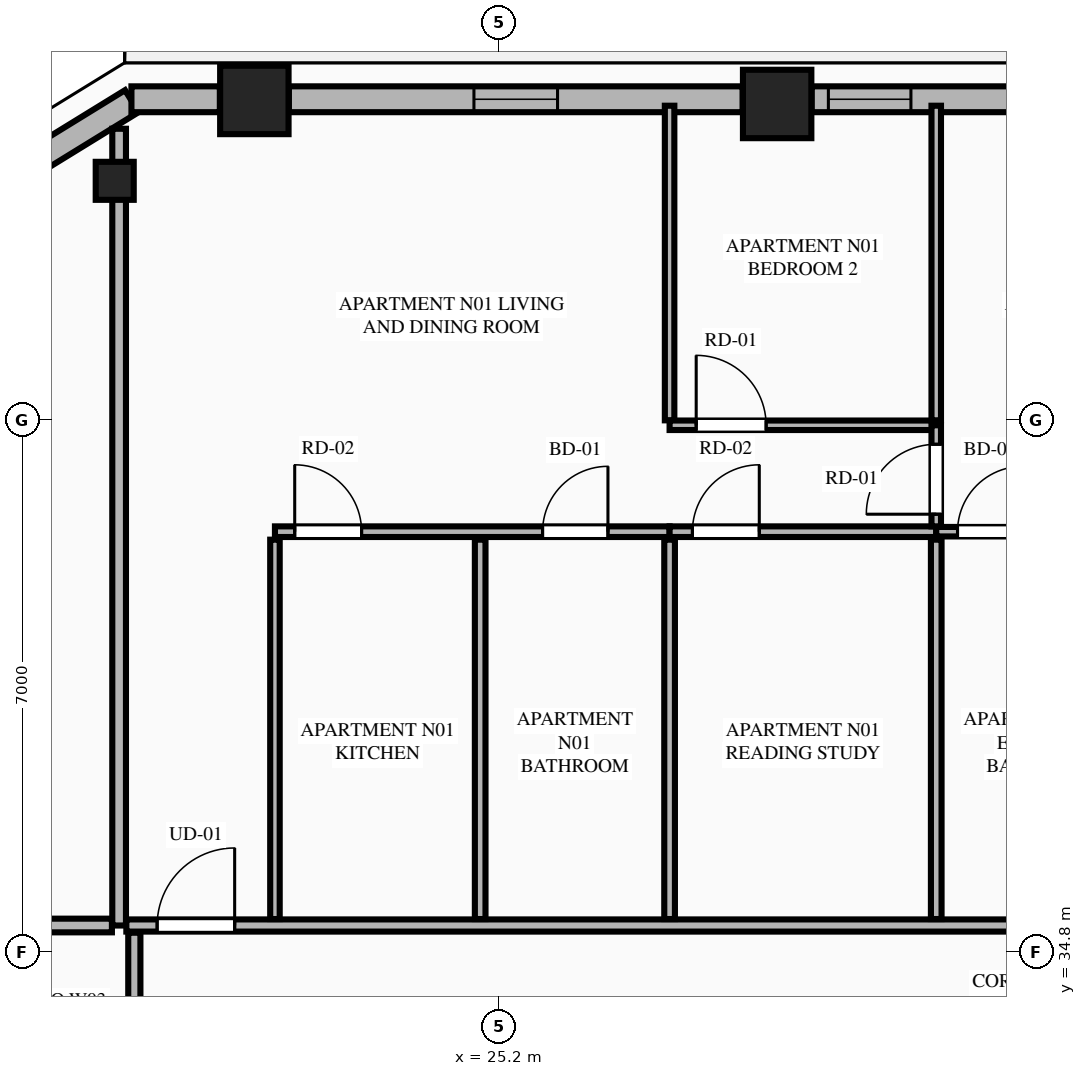
"""IFC4 building model, lengths in metres.
Left out: names, types, materials, properties, quantities, classifications, styles, units other than length and angle.
Written with IfcOpenShell. Run it as: python <this file> out.ifc"""

import sys

from ifc_helpers import new_model, si_unit, direction, frame, frame_2d, origin, origin_2d, place, context, subcontext, project, spatial, rectangle, extrude, element, fill, save


model = new_model("IFC4")
c1 = context("Model", 3, precision=1e-05, world=origin(), true_north=direction((0.0, 1.0)))
c2 = subcontext(c1, "Body", "Model", "MODEL_VIEW")
j1 = project(units=[si_unit("LENGTHUNIT", "METRE"), si_unit("PLANEANGLEUNIT", "RADIAN")], contexts=[c1])
p1 = place(None, origin())
s1 = spatial("IfcSite", under=j1, at=p1, CompositionType="ELEMENT")
p2 = place(p1, origin())
s2 = spatial("IfcBuilding", under=s1, at=p2, CompositionType="ELEMENT")
p3 = place(p2, frame((0.0, 0.0, 200.3)))
s3 = spatial("IfcBuildingStorey", under=s2, at=p3, CompositionType="ELEMENT", Elevation=200.3)
for number, where, z_axis, x_axis in (
    (1, (28.857, 45.958, 0.0), (0.0, 0.0, 1.0), (1.0, 0.0, 0.0)),
    (2, (21.979, 46.011, 0.0), (0.0, 0.0, 1.0), (1.0, 0.0, 0.0)),
):
    element("IfcColumn", number, at=place(p3, frame(where, z_axis=z_axis, x_axis=x_axis)), inside=s3, PredefinedType="COLUMN", context=c2, shape_type="SweptSolid", body=[
        extrude(rectangle(XDim=0.9, YDim=0.9, at=origin_2d()), origin(), (0.0, 0.0, 1.0), 3.55),
    ])
p4 = place(p3, frame((20.142, 44.947, 0.0), z_axis=(0.0, 0.0, 1.0), x_axis=(-0.865230187018, -0.501374833306, 0.0)))
e3 = element("IfcColumn", 3, at=p4, inside=s3, PredefinedType="PILASTER", context=c2, shape_type="SweptSolid", body=[
    extrude(rectangle(XDim=0.5, YDim=0.35, at=origin_2d()), origin(), (0.0, 0.0, 1.0), 3.55),
])
p5 = place(p3, frame((20.367, 45.995, 0.0), z_axis=(0.0, 0.0, 1.0), x_axis=(-0.851713271379, -0.524008113828, 0.0)))
e4 = element("IfcWall", 4, at=p5, inside=s3, PredefinedType="STANDARD", context=c2, shape_type="SweptSolid", body=[
    extrude(rectangle(XDim=1.678, YDim=0.34, at=frame_2d((0.839, 0.0))), origin(), (0.0, 0.0, 1.0), 3.35),
])
p6 = place(p3, frame((35.489, 46.02, 0.0), z_axis=(0.0, 0.0, 1.0), x_axis=(-1.0, 0.0, 0.0)))
e5 = element("IfcWall", 5, at=p6, inside=s3, PredefinedType="STANDARD", context=c2, shape_type="SweptSolid", body=[
    extrude(rectangle(XDim=6.178, YDim=0.34, at=frame_2d((3.089, 0.0))), origin(), (0.0, 0.0, 1.0), 2.883),
])
p7 = place(p6, frame((1.668, 0.0, 0.0)))
e6 = element("IfcOpeningElement", 6, at=p7, cuts=e5, PredefinedType="OPENING", context=c2, shape_type="SweptSolid", body=[
    extrude(rectangle(XDim=1.1, YDim=2.25, at=frame_2d((0.55, 1.125))), frame((0.0, 0.18, 0.0), z_axis=(0.0, -1.0, 0.0), x_axis=(1.0, 0.0, 0.0)), (0.0, 0.0, 1.0), 0.36),
])
p8 = place(p6, frame((4.872, 0.0, 0.75)))
e7 = element("IfcOpeningElement", 7, at=p8, cuts=e5, PredefinedType="OPENING", context=c2, shape_type="SweptSolid", body=[
    extrude(rectangle(XDim=1.086, YDim=1.983, at=frame_2d((0.543, 0.991))), frame((0.0, 0.18, 0.0), z_axis=(0.0, -1.0, 0.0), x_axis=(1.0, 0.0, 0.0)), (0.0, 0.0, 1.0), 0.36),
])
p9 = place(p3, frame((28.403, 46.02, 0.0), z_axis=(0.0, 0.0, 1.0), x_axis=(-1.0, 0.0, 0.0)))
e8 = element("IfcWall", 8, at=p9, inside=s3, PredefinedType="STANDARD", context=c2, shape_type="SweptSolid", body=[
    extrude(rectangle(XDim=5.97, YDim=0.34, at=frame_2d((2.985, 0.0))), origin(), (0.0, 0.0, 1.0), 2.883),
])
p10 = place(p9, frame((2.435, 0.0, 0.75)))
e9 = element("IfcOpeningElement", 9, at=p10, cuts=e8, PredefinedType="OPENING", context=c2, shape_type="SweptSolid", body=[
    extrude(rectangle(XDim=1.1, YDim=1.983, at=frame_2d((0.55, 0.991))), frame((0.0, 0.18, 0.0), z_axis=(0.0, -1.0, 0.0), x_axis=(1.0, 0.0, 0.0)), (0.0, 0.0, 1.0), 0.36),
])
p11 = place(p3, frame((21.525, 46.02, 0.0), z_axis=(0.0, 0.0, 1.0), x_axis=(-1.0, 0.0, 0.0)))
e10 = element("IfcWall", 10, at=p11, inside=s3, PredefinedType="STANDARD", context=c2, shape_type="SweptSolid", body=[
    extrude(rectangle(XDim=1.163, YDim=0.34, at=frame_2d((0.582, 0.0))), origin(), (0.0, 0.0, 1.0), 3.35),
])
p12 = place(p3, frame((20.2, 35.15, 0.0), z_axis=(0.0, 0.0, 1.0), x_axis=(0.0, 1.0, 0.0)))
e11 = element("IfcWall", 11, at=p12, inside=s3, PredefinedType="PARTITIONING", context=c2, shape_type="SweptSolid", body=[
    extrude(rectangle(XDim=10.482, YDim=0.18, at=frame_2d((5.241, 0.0))), origin(), (0.0, 0.0, 1.0), 3.35),
])
p13 = place(p3, frame((20.295, 35.15, 0.0), z_axis=(0.0, 0.0, 1.0), x_axis=(1.0, 0.0, 0.0)))
e12 = element("IfcWall", 12, at=p13, inside=s3, PredefinedType="PARTITIONING", context=c2, shape_type="SweptSolid", body=[
    extrude(rectangle(XDim=15.553, YDim=0.16, at=frame_2d((7.776, 0.0))), origin(), (0.0, 0.0, 1.0), 3.35),
])
p14 = place(p13, frame((0.405, 0.0, 0.0)))
e13 = element("IfcOpeningElement", 13, at=p14, cuts=e12, PredefinedType="OPENING", context=c2, shape_type="SweptSolid", body=[
    extrude(rectangle(XDim=1.02, YDim=2.25, at=frame_2d((0.51, 1.125))), frame((0.0, 0.09, 0.0), z_axis=(0.0, -1.0, 0.0), x_axis=(1.0, 0.0, 0.0)), (0.0, 0.0, 1.0), 0.18),
])
p15 = place(p3, frame((22.25, 35.235, 0.0), z_axis=(0.0, 0.0, 1.0), x_axis=(0.0, 1.0, 0.0)))
e14 = element("IfcWall", 14, at=p15, inside=s3, PredefinedType="PARTITIONING", context=c2, shape_type="SweptSolid", body=[
    extrude(rectangle(XDim=4.991, YDim=0.125, at=frame_2d((2.496, 0.0))), origin(), (0.0, 0.0, 1.0), 2.807),
])
p16 = place(p3, frame((22.25, 40.331, 0.0), z_axis=(0.0, 0.0, 1.0), x_axis=(1.0, 0.0, 0.0)))
e15 = element("IfcWall", 15, at=p16, inside=s3, PredefinedType="PLUMBINGWALL", context=c2, shape_type="SweptSolid", body=[
    extrude(rectangle(XDim=5.192, YDim=0.14, at=frame_2d((2.596, 0.0))), origin(), (0.0, 0.0, 1.0), 3.35),
])
p17 = place(p16, frame((3.521, 0.0, 0.0)))
e16 = element("IfcOpeningElement", 16, at=p17, cuts=e15, PredefinedType="OPENING", context=c2, shape_type="SweptSolid", body=[
    extrude(rectangle(XDim=0.86, YDim=2.1, at=frame_2d((0.43, 1.05))), frame((0.0, 0.08, 0.0), z_axis=(0.0, -1.0, 0.0), x_axis=(1.0, 0.0, 0.0)), (0.0, 0.0, 1.0), 0.16),
])
p18 = place(p16, frame((0.26, 0.0, 0.0)))
e17 = element("IfcOpeningElement", 17, at=p18, cuts=e15, PredefinedType="OPENING", context=c2, shape_type="SweptSolid", body=[
    extrude(rectangle(XDim=0.88, YDim=2.15, at=frame_2d((0.44, 1.075))), frame((0.0, 0.08, 0.0), z_axis=(0.0, -1.0, 0.0), x_axis=(1.0, 0.0, 0.0)), (0.0, 0.0, 1.0), 0.16),
])
p19 = place(p3, frame((27.442, 40.331, 0.0), z_axis=(0.0, 0.0, 1.0), x_axis=(1.0, 0.0, 0.0)))
e18 = element("IfcWall", 18, at=p19, inside=s3, PredefinedType="PLUMBINGWALL", context=c2, shape_type="SweptSolid", body=[
    extrude(rectangle(XDim=3.508, YDim=0.14, at=frame_2d((1.754, 0.0))), origin(), (0.0, 0.0, 1.0), 3.35),
])
p20 = place(p19, frame((0.3, 0.0, 0.0)))
e19 = element("IfcOpeningElement", 19, at=p20, cuts=e18, PredefinedType="OPENING", context=c2, shape_type="SweptSolid", body=[
    extrude(rectangle(XDim=0.88, YDim=2.15, at=frame_2d((0.44, 1.075))), frame((0.0, 0.08, 0.0), z_axis=(0.0, -1.0, 0.0), x_axis=(1.0, 0.0, 0.0)), (0.0, 0.0, 1.0), 0.16),
])
p21 = place(p3, frame((30.95, 40.331, 0.0), z_axis=(0.0, 0.0, 1.0), x_axis=(1.0, 0.0, 0.0)))
e20 = element("IfcWall", 20, at=p21, inside=s3, PredefinedType="PARTITIONING", context=c2, shape_type="SweptSolid", body=[
    extrude(rectangle(XDim=4.898, YDim=0.125, at=frame_2d((2.449, 0.0))), origin(), (0.0, 0.0, 1.0), 3.35),
])
p22 = place(p21, frame((0.28, 0.0, 0.0)))
e21 = element("IfcOpeningElement", 21, at=p22, cuts=e20, PredefinedType="OPENING", context=c2, shape_type="SweptSolid", body=[
    extrude(rectangle(XDim=0.86, YDim=2.1, at=frame_2d((0.43, 1.05))), frame((0.0, 0.073, 0.0), z_axis=(0.0, -1.0, 0.0), x_axis=(1.0, 0.0, 0.0)), (0.0, 0.0, 1.0), 0.145),
])
p23 = place(p21, frame((3.028, 0.0, 0.0)))
e22 = element("IfcOpeningElement", 22, at=p23, cuts=e20, PredefinedType="OPENING", context=c2, shape_type="SweptSolid", body=[
    extrude(rectangle(XDim=0.88, YDim=2.15, at=frame_2d((0.44, 1.075))), frame((0.0, 0.073, 0.0), z_axis=(0.0, -1.0, 0.0), x_axis=(1.0, 0.0, 0.0)), (0.0, 0.0, 1.0), 0.145),
])
p24 = place(p3, frame((24.95, 35.235, 0.0), z_axis=(0.0, 0.0, 1.0), x_axis=(0.0, 1.0, 0.0)))
e23 = element("IfcWall", 23, at=p24, inside=s3, PredefinedType="PLUMBINGWALL", context=c2, shape_type="SweptSolid", body=[
    extrude(rectangle(XDim=4.991, YDim=0.14, at=frame_2d((2.496, 0.0))), origin(), (0.0, 0.0, 1.0), 3.35),
])
p25 = place(p3, frame((27.442, 41.796, 0.0), z_axis=(0.0, 0.0, 1.0), x_axis=(0.0, 1.0, 0.0)))
e24 = element("IfcWall", 24, at=p25, inside=s3, PredefinedType="PARTITIONING", context=c2, shape_type="SweptSolid", body=[
    extrude(rectangle(XDim=4.139, YDim=0.125, at=frame_2d((2.07, 0.0))), origin(), (0.0, 0.0, 1.0), 3.35),
])
p26 = place(p3, frame((27.442, 41.731, 0.0), z_axis=(0.0, 0.0, 1.0), x_axis=(1.0, 0.0, 0.0)))
e25 = element("IfcWall", 25, at=p26, inside=s3, PredefinedType="PARTITIONING", context=c2, shape_type="SweptSolid", body=[
    extrude(rectangle(XDim=3.508, YDim=0.125, at=frame_2d((1.754, 0.0))), origin(), (0.0, 0.0, 1.0), 3.35),
])
p27 = place(p26, frame((0.35, 0.0, 0.0)))
e26 = element("IfcOpeningElement", 26, at=p27, cuts=e25, PredefinedType="OPENING", context=c2, shape_type="SweptSolid", body=[
    extrude(rectangle(XDim=0.92, YDim=2.15, at=frame_2d((0.46, 1.075))), frame((0.0, 0.073, 0.0), z_axis=(0.0, -1.0, 0.0), x_axis=(1.0, 0.0, 0.0)), (0.0, 0.0, 1.0), 0.145),
])
p28 = place(p3, frame((30.95, 40.401, 0.0), z_axis=(0.0, 0.0, 1.0), x_axis=(0.0, 1.0, 0.0)))
e27 = element("IfcWall", 27, at=p28, inside=s3, PredefinedType="PARTITIONING", context=c2, shape_type="SweptSolid", body=[
    extrude(rectangle(XDim=1.33, YDim=0.125, at=frame_2d((0.665, 0.0))), origin(), (0.0, 0.0, 1.0), 3.35),
])
p29 = place(p28, frame((0.16, 0.0, 0.0)))
e28 = element("IfcOpeningElement", 28, at=p29, cuts=e27, PredefinedType="OPENING", context=c2, shape_type="SweptSolid", body=[
    extrude(rectangle(XDim=0.92, YDim=2.15, at=frame_2d((0.46, 1.075))), frame((0.0, 0.073, 0.0), z_axis=(0.0, -1.0, 0.0), x_axis=(1.0, 0.0, 0.0)), (0.0, 0.0, 1.0), 0.145),
])
for number, where, z_axis, x_axis in (
    (29, (27.442, 35.235, 0.0), (0.0, 0.0, 1.0), (0.0, 1.0, 0.0)),
    (30, (30.95, 35.235, 0.0), (0.0, 0.0, 1.0), (0.0, 1.0, 0.0)),
):
    element("IfcWall", number, at=place(p3, frame(where, z_axis=z_axis, x_axis=x_axis)), inside=s3, PredefinedType="PLUMBINGWALL", context=c2, shape_type="SweptSolid", body=[
        extrude(rectangle(XDim=4.991, YDim=0.14, at=frame_2d((2.496, 0.0))), origin(), (0.0, 0.0, 1.0), 3.35),
    ])
p30 = place(p3, frame((30.95, 41.796, 0.0), z_axis=(0.0, 0.0, 1.0), x_axis=(0.0, 1.0, 0.0)))
e31 = element("IfcWall", 31, at=p30, inside=s3, PredefinedType="PARTITIONING", context=c2, shape_type="SweptSolid", body=[
    extrude(rectangle(XDim=4.139, YDim=0.125, at=frame_2d((2.07, 0.0))), origin(), (0.0, 0.0, 1.0), 3.35),
])
p31 = place(p3, frame((14.11, 35.15, 0.0), z_axis=(0.0, 0.0, 1.0), x_axis=(1.0, 0.0, 0.0)))
e32 = element("IfcWall", 32, at=p31, inside=s3, PredefinedType="PARTITIONING", context=c2, shape_type="SweptSolid", body=[
    extrude(rectangle(XDim=5.995, YDim=0.18, at=frame_2d((2.998, 0.0))), origin(), (0.0, 0.0, 1.0), 3.35),
])
p32 = place(p3, frame((20.4, 29.008, 0.0), z_axis=(0.0, 0.0, 1.0), x_axis=(0.0, 1.0, 0.0)))
e33 = element("IfcWall", 33, at=p32, inside=s3, PredefinedType="PARTITIONING", context=c2, shape_type="SweptSolid", body=[
    extrude(rectangle(XDim=6.047, YDim=0.16, at=frame_2d((3.023, 0.0))), origin(), (0.0, 0.0, 1.0), 3.35),
])
p33 = place(p32, frame((0.4, 0.0, 0.0)))
e34 = element("IfcOpeningElement", 34, at=p33, cuts=e33, PredefinedType="OPENING", context=c2, shape_type="SweptSolid", body=[
    extrude(rectangle(XDim=1.02, YDim=2.25, at=frame_2d((0.51, 1.125))), frame((0.0, 0.09, 0.0), z_axis=(0.0, -1.0, 0.0), x_axis=(1.0, 0.0, 0.0)), (0.0, 0.0, 1.0), 0.18),
])
p34 = place(p10, origin())
e35 = element("IfcWindow", 35, at=p34, inside=s3, PartitioningType="SINGLE_PANEL", PredefinedType="WINDOW", context=c2, shape_type="SweptSolid", body=[
    extrude(rectangle(XDim=1.1, YDim=1.983, at=frame_2d((0.55, 0.991))), frame((0.0, 0.03, 0.0), z_axis=(0.0, -1.0, 0.0), x_axis=(1.0, 0.0, 0.0)), (0.0, 0.0, 1.0), 0.06),
])
fill(e9, e35)
p35 = place(p17, origin())
e36 = element("IfcDoor", 36, at=p35, inside=s3, OperationType="SINGLE_SWING_RIGHT", PredefinedType="DOOR", context=c2, shape_type="SweptSolid", body=[
    extrude(rectangle(XDim=0.86, YDim=2.1, at=frame_2d((0.43, 1.05))), frame((0.0, 0.025, 0.0), z_axis=(0.0, -1.0, 0.0), x_axis=(1.0, 0.0, 0.0)), (0.0, 0.0, 1.0), 0.05),
])
fill(e16, e36)
p36 = place(p22, origin())
e37 = element("IfcDoor", 37, at=p36, inside=s3, OperationType="SINGLE_SWING_RIGHT", PredefinedType="DOOR", context=c2, shape_type="SweptSolid", body=[
    extrude(rectangle(XDim=0.86, YDim=2.1, at=frame_2d((0.43, 1.05))), frame((0.0, 0.025, 0.0), z_axis=(0.0, -1.0, 0.0), x_axis=(1.0, 0.0, 0.0)), (0.0, 0.0, 1.0), 0.05),
])
fill(e21, e37)
p37 = place(p14, origin())
e38 = element("IfcDoor", 38, at=p37, inside=s3, OperationType="SINGLE_SWING_RIGHT", PredefinedType="DOOR", context=c2, shape_type="SweptSolid", body=[
    extrude(rectangle(XDim=1.02, YDim=2.25, at=frame_2d((0.51, 1.125))), frame((0.0, 0.025, 0.0), z_axis=(0.0, -1.0, 0.0), x_axis=(1.0, 0.0, 0.0)), (0.0, 0.0, 1.0), 0.05),
])
fill(e13, e38)
p38 = place(p18, origin())
e39 = element("IfcDoor", 39, at=p38, inside=s3, OperationType="SINGLE_SWING_LEFT", PredefinedType="DOOR", context=c2, shape_type="SweptSolid", body=[
    extrude(rectangle(XDim=0.88, YDim=2.15, at=frame_2d((0.44, 1.075))), frame((0.0, 0.025, 0.0), z_axis=(0.0, -1.0, 0.0), x_axis=(1.0, 0.0, 0.0)), (0.0, 0.0, 1.0), 0.05),
])
fill(e17, e39)
p39 = place(p20, origin())
e40 = element("IfcDoor", 40, at=p39, inside=s3, OperationType="SINGLE_SWING_RIGHT", PredefinedType="DOOR", context=c2, shape_type="SweptSolid", body=[
    extrude(rectangle(XDim=0.88, YDim=2.15, at=frame_2d((0.44, 1.075))), frame((0.0, 0.025, 0.0), z_axis=(0.0, -1.0, 0.0), x_axis=(1.0, 0.0, 0.0)), (0.0, 0.0, 1.0), 0.05),
])
fill(e19, e40)
p40 = place(p27, origin())
e41 = element("IfcDoor", 41, at=p40, inside=s3, OperationType="SINGLE_SWING_LEFT", PredefinedType="DOOR", context=c2, shape_type="SweptSolid", body=[
    extrude(rectangle(XDim=0.92, YDim=2.15, at=frame_2d((0.46, 1.075))), frame((0.0, 0.025, 0.0), z_axis=(0.0, -1.0, 0.0), x_axis=(1.0, 0.0, 0.0)), (0.0, 0.0, 1.0), 0.05),
])
fill(e26, e41)
p41 = place(p29, origin())
e42 = element("IfcDoor", 42, at=p41, inside=s3, OperationType="SINGLE_SWING_LEFT", PredefinedType="DOOR", context=c2, shape_type="SweptSolid", body=[
    extrude(rectangle(XDim=0.92, YDim=2.15, at=frame_2d((0.46, 1.075))), frame((0.0, 0.025, 0.0), z_axis=(0.0, -1.0, 0.0), x_axis=(1.0, 0.0, 0.0)), (0.0, 0.0, 1.0), 0.05),
])
fill(e28, e42)
p42 = place(p8, origin())
e43 = element("IfcWindow", 43, at=p42, inside=s3, PartitioningType="SINGLE_PANEL", PredefinedType="WINDOW", context=c2, shape_type="SweptSolid", body=[
    extrude(rectangle(XDim=1.086, YDim=1.983, at=frame_2d((0.543, 0.991))), frame((0.0, 0.03, 0.0), z_axis=(0.0, -1.0, 0.0), x_axis=(1.0, 0.0, 0.0)), (0.0, 0.0, 1.0), 0.06),
])
fill(e7, e43)
save(model, sys.argv[1])
